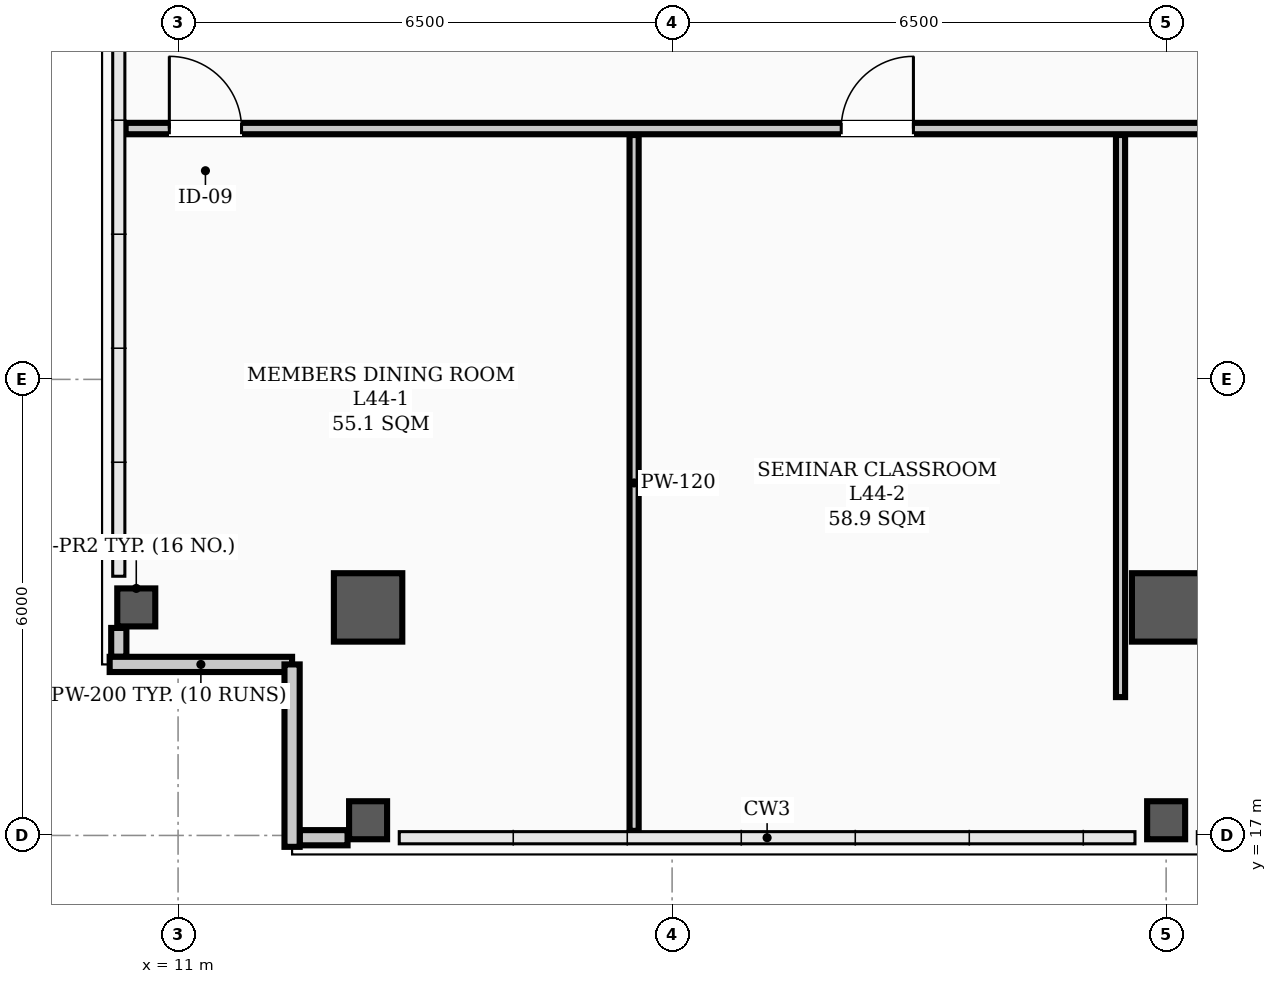
"""IFC4 building model, lengths in metres.
Left out: names, types, materials, properties, quantities, classifications, styles, units other than length and angle.
Written with IfcOpenShell. Run it as: python <this file> out.ifc"""

import sys

from ifc_helpers import new_model, si_unit, direction, frame, frame_2d, origin, origin_2d, place, context, subcontext, project, spatial, rectangle, hollow_rectangle, extrude, element, fill, save


model = new_model("IFC4")
c1 = context("Model", 3, precision=1e-05, world=origin(), true_north=direction((0.0, 1.0)))
c2 = subcontext(c1, "Body", "Model", "MODEL_VIEW")
j1 = project(units=[si_unit("LENGTHUNIT", "METRE"), si_unit("PLANEANGLEUNIT", "RADIAN")], contexts=[c1])
p1 = place(None, origin())
s1 = spatial("IfcSite", under=j1, at=p1, CompositionType="ELEMENT")
p2 = place(p1, origin())
s2 = spatial("IfcBuilding", under=s1, at=p2, CompositionType="ELEMENT")
p3 = place(p2, frame((0.0, 0.0, 177.3)))
s3 = spatial("IfcBuildingStorey", under=s2, at=p3, CompositionType="ELEMENT", Elevation=177.3)
for number, where, z_axis, x_axis in (
    (1, (13.5, 20.0, 0.0), (0.0, 0.0, 1.0), (1.0, 0.0, 0.0)),
    (2, (24.0, 20.0, 0.0), (0.0, 0.0, 1.0), (1.0, 0.0, 0.0)),
):
    element("IfcColumn", number, at=place(p3, frame(where, z_axis=z_axis, x_axis=x_axis)), inside=s3, PredefinedType="COLUMN", context=c2, shape_type="SweptSolid", body=[
        extrude(hollow_rectangle(XDim=0.9, YDim=0.9, WallThickness=0.035, InnerFilletRadius=0.017, OuterFilletRadius=0.052, at=origin_2d()), origin(), (0.0, 0.0, 1.0), 3.9),
    ])
for number, where, z_axis, x_axis in (
    (3, (10.45, 20.0, 0.0), (0.0, 0.0, 1.0), (1.0, 0.0, 0.0)),
    (4, (13.5, 17.2, 0.0), (0.0, 0.0, 1.0), (1.0, 0.0, 0.0)),
    (5, (24.0, 17.2, 0.0), (0.0, 0.0, 1.0), (1.0, 0.0, 0.0)),
):
    element("IfcColumn", number, at=place(p3, frame(where, z_axis=z_axis, x_axis=x_axis)), inside=s3, PredefinedType="COLUMN", context=c2, shape_type="SweptSolid", body=[
        extrude(hollow_rectangle(XDim=0.5, YDim=0.5, WallThickness=0.024, InnerFilletRadius=0.012, OuterFilletRadius=0.036, at=origin_2d()), origin(), (0.0, 0.0, 1.0), 3.9),
    ])
p4 = place(p3, frame((10.22, 19.35, 0.0), z_axis=(0.0, 0.0, 1.0), x_axis=(0.0, 1.0, 0.0)))
e6 = element("IfcWall", 6, at=p4, inside=s3, PredefinedType="PARAPET", context=c2, shape_type="SweptSolid", body=[
    extrude(rectangle(XDim=0.38, YDim=0.2, at=frame_2d((0.19, 0.0))), origin(), (0.0, 0.0, 1.0), 1.2),
])
p5 = place(p3, frame((12.6, 16.97, 0.0), z_axis=(0.0, 0.0, 1.0), x_axis=(1.0, 0.0, 0.0)))
e7 = element("IfcWall", 7, at=p5, inside=s3, PredefinedType="PARAPET", context=c2, shape_type="SweptSolid", body=[
    extrude(rectangle(XDim=0.63, YDim=0.2, at=frame_2d((0.315, 0.0))), origin(), (0.0, 0.0, 1.0), 1.2),
])
for number, where, z_axis, x_axis in (
    (8, (10.1, 19.25, 0.0), (0.0, 0.0, 1.0), (1.0, 0.0, 0.0)),
    (9, (12.5, 19.25, 0.0), (0.0, 0.0, 1.0), (0.0, -1.0, 0.0)),
):
    element("IfcWall", number, at=place(p3, frame(where, z_axis=z_axis, x_axis=x_axis)), inside=s3, PredefinedType="PARAPET", context=c2, shape_type="SweptSolid", body=[
        extrude(rectangle(XDim=2.4, YDim=0.2, at=frame_2d((1.2, 0.0))), origin(), (0.0, 0.0, 1.0), 1.2),
    ])
p6 = place(p3, frame((10.31, 26.3, 0.0), z_axis=(0.0, 0.0, 1.0), x_axis=(1.0, 0.0, 0.0)))
e10 = element("IfcWall", 10, at=p6, inside=s3, PredefinedType="PARTITIONING", context=c2, shape_type="SweptSolid", body=[
    extrude(rectangle(XDim=43.38, YDim=0.15, at=frame_2d((21.69, 0.0))), origin(), (0.0, 0.0, 1.0), 3.2),
])
p7 = place(p6, frame((0.575, 0.0, 0.0)))
e11 = element("IfcOpeningElement", 11, at=p7, cuts=e10, PredefinedType="OPENING", context=c2, shape_type="SweptSolid", body=[
    extrude(rectangle(XDim=0.95, YDim=2.08, at=frame_2d((0.475, 1.04))), frame((0.0, 0.085, 0.0), z_axis=(0.0, -1.0, 0.0), x_axis=(1.0, 0.0, 0.0)), (0.0, 0.0, 1.0), 0.17),
])
p8 = place(p6, frame((9.415, 0.0, 0.0)))
e12 = element("IfcOpeningElement", 12, at=p8, cuts=e10, PredefinedType="OPENING", context=c2, shape_type="SweptSolid", body=[
    extrude(rectangle(XDim=0.95, YDim=2.08, at=frame_2d((0.475, 1.04))), frame((0.0, 0.085, 0.0), z_axis=(0.0, -1.0, 0.0), x_axis=(1.0, 0.0, 0.0)), (0.0, 0.0, 1.0), 0.17),
])
p9 = place(p6, frame((16.115, 0.0, 0.0)))
e13 = element("IfcOpeningElement", 13, at=p9, cuts=e10, PredefinedType="OPENING", context=c2, shape_type="SweptSolid", body=[
    extrude(rectangle(XDim=0.95, YDim=2.08, at=frame_2d((0.475, 1.04))), frame((0.0, 0.085, 0.0), z_axis=(0.0, -1.0, 0.0), x_axis=(1.0, 0.0, 0.0)), (0.0, 0.0, 1.0), 0.17),
])
p10 = place(p6, frame((22.715, 0.0, 0.0)))
e14 = element("IfcOpeningElement", 14, at=p10, cuts=e10, PredefinedType="OPENING", context=c2, shape_type="SweptSolid", body=[
    extrude(rectangle(XDim=0.95, YDim=2.08, at=frame_2d((0.475, 1.04))), frame((0.0, 0.085, 0.0), z_axis=(0.0, -1.0, 0.0), x_axis=(1.0, 0.0, 0.0)), (0.0, 0.0, 1.0), 0.17),
])
p11 = place(p6, frame((29.015, 0.0, 0.0)))
e15 = element("IfcOpeningElement", 15, at=p11, cuts=e10, PredefinedType="OPENING", context=c2, shape_type="SweptSolid", body=[
    extrude(rectangle(XDim=0.95, YDim=2.08, at=frame_2d((0.475, 1.04))), frame((0.0, 0.085, 0.0), z_axis=(0.0, -1.0, 0.0), x_axis=(1.0, 0.0, 0.0)), (0.0, 0.0, 1.0), 0.17),
])
p12 = place(p6, frame((34.79, 0.0, 0.0)))
e16 = element("IfcOpeningElement", 16, at=p12, cuts=e10, PredefinedType="OPENING", context=c2, shape_type="SweptSolid", body=[
    extrude(rectangle(XDim=0.95, YDim=2.08, at=frame_2d((0.475, 1.04))), frame((0.0, 0.085, 0.0), z_axis=(0.0, -1.0, 0.0), x_axis=(1.0, 0.0, 0.0)), (0.0, 0.0, 1.0), 0.17),
])
p13 = place(p3, frame((17.0, 17.06, 0.0), z_axis=(0.0, 0.0, 1.0), x_axis=(0.0, 1.0, 0.0)))
e17 = element("IfcWall", 17, at=p13, inside=s3, PredefinedType="PARTITIONING", context=c2, shape_type="SweptSolid", body=[
    extrude(rectangle(XDim=9.155, YDim=0.12, at=frame_2d((4.578, 0.0))), origin(), (0.0, 0.0, 1.0), 3.1),
])
p14 = place(p3, frame((23.4, 18.82, 0.0), z_axis=(0.0, 0.0, 1.0), x_axis=(0.0, 1.0, 0.0)))
e18 = element("IfcWall", 18, at=p14, inside=s3, PredefinedType="PARTITIONING", context=c2, shape_type="SweptSolid", body=[
    extrude(rectangle(XDim=7.395, YDim=0.12, at=frame_2d((3.698, 0.0))), origin(), (0.0, 0.0, 1.0), 3.1),
])
p15 = place(p7, origin())
e19 = element("IfcDoor", 19, at=p15, inside=s3, OperationType="SINGLE_SWING_LEFT", PredefinedType="DOOR", context=c2, shape_type="SweptSolid", body=[
    extrude(rectangle(XDim=0.95, YDim=2.08, at=frame_2d((0.475, 1.04))), frame((0.0, 0.025, 0.0), z_axis=(0.0, -1.0, 0.0), x_axis=(1.0, 0.0, 0.0)), (0.0, 0.0, 1.0), 0.05),
])
fill(e11, e19)
p16 = place(p8, origin())
e20 = element("IfcDoor", 20, at=p16, inside=s3, OperationType="SINGLE_SWING_RIGHT", PredefinedType="DOOR", context=c2, shape_type="SweptSolid", body=[
    extrude(rectangle(XDim=0.95, YDim=2.08, at=frame_2d((0.475, 1.04))), frame((0.0, 0.025, 0.0), z_axis=(0.0, -1.0, 0.0), x_axis=(1.0, 0.0, 0.0)), (0.0, 0.0, 1.0), 0.05),
])
fill(e12, e20)
save(model, sys.argv[1])
